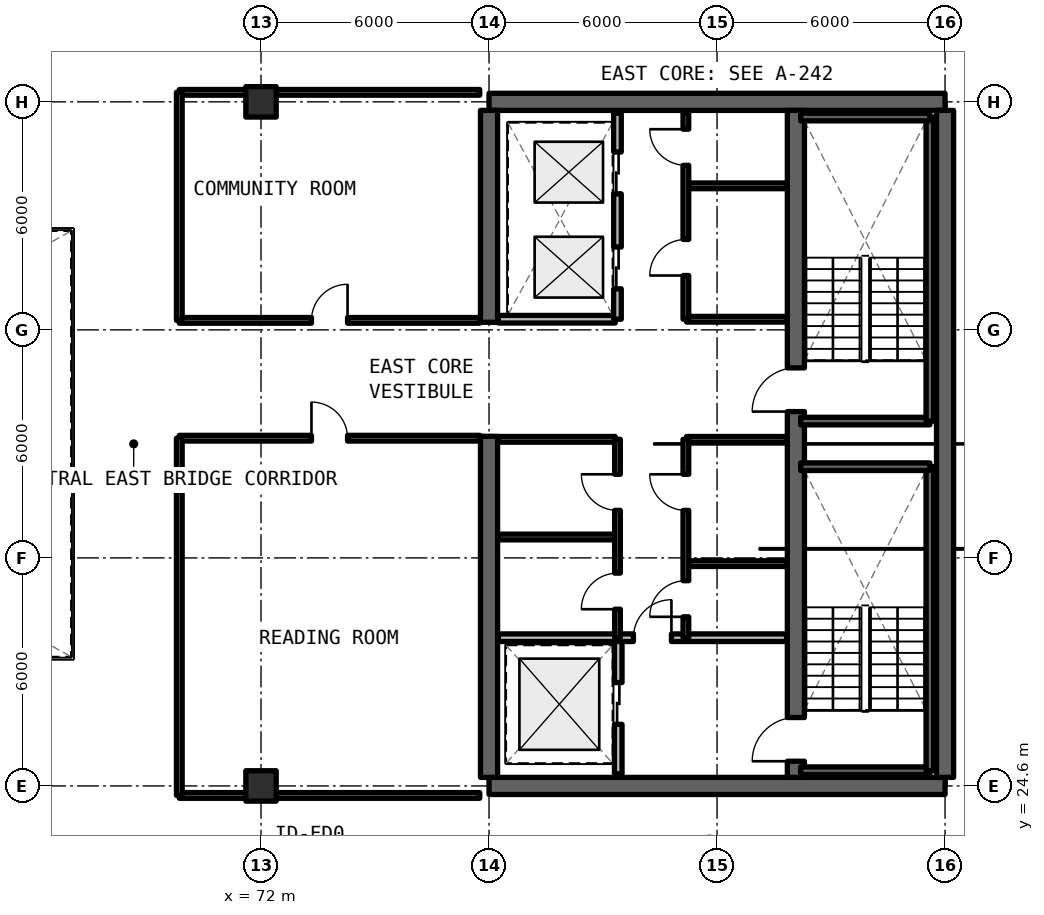
"""IFC4 building model, lengths in metres.
Left out: names, types, materials, properties, quantities, classifications, styles, units other than length and angle.
Written with IfcOpenShell. Run it as: python <this file> out.ifc"""

import sys

from ifc_helpers import new_model, si_unit, direction, frame, frame_2d, origin, origin_2d, place, context, subcontext, project, spatial, rectangle, extrude, element, fill, save


model = new_model("IFC4")
c1 = context("Model", 3, precision=1e-05, world=origin(), true_north=direction((0.0, 1.0)))
c2 = subcontext(c1, "Body", "Model", "MODEL_VIEW")
j1 = project(units=[si_unit("LENGTHUNIT", "METRE"), si_unit("PLANEANGLEUNIT", "RADIAN")], contexts=[c1])
p1 = place(None, origin())
s1 = spatial("IfcSite", under=j1, at=p1, CompositionType="ELEMENT")
p2 = place(p1, origin())
s2 = spatial("IfcBuilding", under=s1, at=p2, CompositionType="ELEMENT")
p3 = place(p2, frame((0.0, 0.0, 188.43)))
s3 = spatial("IfcBuildingStorey", under=s2, at=p3, CompositionType="ELEMENT", Elevation=188.43)
for number, where, z_axis, x_axis in (
    (1, (78.0, 24.6, 0.0), (0.0, 0.0, 1.0), (1.0, 0.0, 0.0)),
    (2, (90.0, 42.6, 0.0), (0.0, 0.0, 1.0), (-1.0, 0.0, 0.0)),
):
    element("IfcWall", number, at=place(p3, frame(where, z_axis=z_axis, x_axis=x_axis)), inside=s3, PredefinedType="SHEAR", context=c2, shape_type="SweptSolid", body=[
        extrude(rectangle(XDim=12.0, YDim=0.45, at=frame_2d((6.0, 0.0))), origin(), (0.0, 0.0, 1.0), 3.3),
    ])
p4 = place(p3, frame((90.0, 24.825, 0.0), z_axis=(0.0, 0.0, 1.0), x_axis=(0.0, 1.0, 0.0)))
e3 = element("IfcWall", 3, at=p4, inside=s3, PredefinedType="SHEAR", context=c2, shape_type="SweptSolid", body=[
    extrude(rectangle(XDim=17.55, YDim=0.45, at=frame_2d((8.775, 0.0))), origin(), (0.0, 0.0, 1.0), 3.3),
])
p5 = place(p3, frame((78.0, 24.825, 0.0), z_axis=(0.0, 0.0, 1.0), x_axis=(0.0, 1.0, 0.0)))
e4 = element("IfcWall", 4, at=p5, inside=s3, PredefinedType="SHEAR", context=c2, shape_type="SweptSolid", body=[
    extrude(rectangle(XDim=8.975, YDim=0.45, at=frame_2d((4.488, 0.0))), origin(), (0.0, 0.0, 1.0), 3.3),
])
p6 = place(p3, frame((78.0, 36.8, 0.0), z_axis=(0.0, 0.0, 1.0), x_axis=(0.0, 1.0, 0.0)))
e5 = element("IfcWall", 5, at=p6, inside=s3, PredefinedType="SHEAR", context=c2, shape_type="SweptSolid", body=[
    extrude(rectangle(XDim=5.575, YDim=0.45, at=frame_2d((2.788, 0.0))), origin(), (0.0, 0.0, 1.0), 3.3),
])
p7 = place(p3, frame((86.075, 24.825, 0.0), z_axis=(0.0, 0.0, 1.0), x_axis=(0.0, 1.0, 0.0)))
e6 = element("IfcWall", 6, at=p7, inside=s3, PredefinedType="SHEAR", context=c2, shape_type="SweptSolid", body=[
    extrude(rectangle(XDim=17.55, YDim=0.45, at=frame_2d((8.775, 0.0))), origin(), (0.0, 0.0, 1.0), 3.3),
])
p8 = place(p7, frame((0.425, 0.0, 0.0)))
e7 = element("IfcOpeningElement", 7, at=p8, cuts=e6, PredefinedType="OPENING", context=c2, shape_type="SweptSolid", body=[
    extrude(rectangle(XDim=1.15, YDim=2.15, at=frame_2d((0.575, 1.075))), frame((0.0, 0.235, 0.0), z_axis=(0.0, -1.0, 0.0), x_axis=(1.0, 0.0, 0.0)), (0.0, 0.0, 1.0), 0.47),
])
p9 = place(p7, frame((9.625, 0.0, 0.0)))
e8 = element("IfcOpeningElement", 8, at=p9, cuts=e6, PredefinedType="OPENING", context=c2, shape_type="SweptSolid", body=[
    extrude(rectangle(XDim=1.15, YDim=2.15, at=frame_2d((0.575, 1.075))), frame((0.0, 0.235, 0.0), z_axis=(0.0, -1.0, 0.0), x_axis=(1.0, 0.0, 0.0)), (0.0, 0.0, 1.0), 0.47),
])
for number, where, z_axis, x_axis in (
    (9, (72.0, 24.6, 0.0), (0.0, 0.0, 1.0), (1.0, 0.0, 0.0)),
    (10, (72.0, 42.6, 0.0), (0.0, 0.0, 1.0), (1.0, 0.0, 0.0)),
):
    element("IfcColumn", number, at=place(p3, frame(where, z_axis=z_axis, x_axis=x_axis)), inside=s3, PredefinedType="COLUMN", context=c2, shape_type="SweptSolid", body=[
        extrude(rectangle(XDim=0.8, YDim=0.8, at=origin_2d()), origin(), (0.0, 0.0, 1.0), 3.3),
    ])
p10 = place(p3, frame((81.4, 24.92, 0.0), z_axis=(0.0, 0.0, 1.0), x_axis=(0.0, 1.0, 0.0)))
e11 = element("IfcWall", 11, at=p10, inside=s3, PredefinedType="SOLIDWALL", context=c2, shape_type="SweptSolid", body=[
    extrude(rectangle(XDim=3.58, YDim=0.2, at=frame_2d((1.79, 0.0))), origin(), (0.0, 0.0, 1.0), 2.35),
])
p11 = place(p10, frame((1.3, 0.0, 0.0)))
e12 = element("IfcOpeningElement", 12, at=p11, cuts=e11, PredefinedType="OPENING", context=c2, shape_type="SweptSolid", body=[
    extrude(rectangle(XDim=1.1, YDim=2.2, at=frame_2d((0.55, 1.1))), frame((0.0, 0.11, 0.0), z_axis=(0.0, -1.0, 0.0), x_axis=(1.0, 0.0, 0.0)), (0.0, 0.0, 1.0), 0.22),
])
p12 = place(p3, frame((78.245, 28.5, 0.0), z_axis=(0.0, 0.0, 1.0), x_axis=(1.0, 0.0, 0.0)))
e13 = element("IfcWall", 13, at=p12, inside=s3, PredefinedType="SOLIDWALL", context=c2, shape_type="SweptSolid", body=[
    extrude(rectangle(XDim=7.585, YDim=0.2, at=frame_2d((3.792, 0.0))), origin(), (0.0, 0.0, 1.0), 2.35),
])
p13 = place(p12, frame((3.555, 0.0, 0.0)))
e14 = element("IfcOpeningElement", 14, at=p13, cuts=e13, PredefinedType="OPENING", context=c2, shape_type="SweptSolid", body=[
    extrude(rectangle(XDim=1.0, YDim=2.15, at=frame_2d((0.5, 1.075))), frame((0.0, 0.11, 0.0), z_axis=(0.0, -1.0, 0.0), x_axis=(1.0, 0.0, 0.0)), (0.0, 0.0, 1.0), 0.22),
])
for number, where, z_axis, x_axis in (
    (15, (83.2, 30.45, 0.0), (0.0, 0.0, 1.0), (1.0, 0.0, 0.0)),
    (16, (83.2, 33.72, 0.0), (0.0, 0.0, 1.0), (1.0, 0.0, 0.0)),
):
    element("IfcWall", number, at=place(p3, frame(where, z_axis=z_axis, x_axis=x_axis)), inside=s3, PredefinedType="SOLIDWALL", context=c2, shape_type="SweptSolid", body=[
        extrude(rectangle(XDim=2.63, YDim=0.15, at=frame_2d((1.315, 0.0))), origin(), (0.0, 0.0, 1.0), 2.35),
    ])
p14 = place(p3, frame((83.18, 28.5, 0.0), z_axis=(0.0, 0.0, 1.0), x_axis=(0.0, 1.0, 0.0)))
e17 = element("IfcWall", 17, at=p14, inside=s3, PredefinedType="SOLIDWALL", context=c2, shape_type="SweptSolid", body=[
    extrude(rectangle(XDim=5.22, YDim=0.15, at=frame_2d((2.61, 0.0))), origin(), (0.0, 0.0, 1.0), 2.35),
])
p15 = place(p14, frame((0.55, 0.0, 0.0)))
e18 = element("IfcOpeningElement", 18, at=p15, cuts=e17, PredefinedType="OPENING", context=c2, shape_type="SweptSolid", body=[
    extrude(rectangle(XDim=0.95, YDim=2.15, at=frame_2d((0.475, 1.075))), frame((0.0, 0.085, 0.0), z_axis=(0.0, -1.0, 0.0), x_axis=(1.0, 0.0, 0.0)), (0.0, 0.0, 1.0), 0.17),
])
p16 = place(p14, frame((3.35, 0.0, 0.0)))
e19 = element("IfcOpeningElement", 19, at=p16, cuts=e17, PredefinedType="OPENING", context=c2, shape_type="SweptSolid", body=[
    extrude(rectangle(XDim=0.95, YDim=2.15, at=frame_2d((0.475, 1.075))), frame((0.0, 0.085, 0.0), z_axis=(0.0, -1.0, 0.0), x_axis=(1.0, 0.0, 0.0)), (0.0, 0.0, 1.0), 0.17),
])
for number, where, z_axis, x_axis in (
    (20, (78.245, 31.15, 0.0), (0.0, 0.0, 1.0), (1.0, 0.0, 0.0)),
    (21, (78.245, 33.72, 0.0), (0.0, 0.0, 1.0), (1.0, 0.0, 0.0)),
):
    element("IfcWall", number, at=place(p3, frame(where, z_axis=z_axis, x_axis=x_axis)), inside=s3, PredefinedType="SOLIDWALL", context=c2, shape_type="SweptSolid", body=[
        extrude(rectangle(XDim=3.075, YDim=0.15, at=frame_2d((1.538, 0.0))), origin(), (0.0, 0.0, 1.0), 2.35),
    ])
p17 = place(p3, frame((81.38, 28.5, 0.0), z_axis=(0.0, 0.0, 1.0), x_axis=(0.0, 1.0, 0.0)))
e22 = element("IfcWall", 22, at=p17, inside=s3, PredefinedType="SOLIDWALL", context=c2, shape_type="SweptSolid", body=[
    extrude(rectangle(XDim=5.22, YDim=0.15, at=frame_2d((2.61, 0.0))), origin(), (0.0, 0.0, 1.0), 2.35),
])
p18 = place(p17, frame((0.75, 0.0, 0.0)))
e23 = element("IfcOpeningElement", 23, at=p18, cuts=e22, PredefinedType="OPENING", context=c2, shape_type="SweptSolid", body=[
    extrude(rectangle(XDim=0.95, YDim=2.15, at=frame_2d((0.475, 1.075))), frame((0.0, 0.085, 0.0), z_axis=(0.0, -1.0, 0.0), x_axis=(1.0, 0.0, 0.0)), (0.0, 0.0, 1.0), 0.17),
])
p19 = place(p17, frame((3.35, 0.0, 0.0)))
e24 = element("IfcOpeningElement", 24, at=p19, cuts=e22, PredefinedType="OPENING", context=c2, shape_type="SweptSolid", body=[
    extrude(rectangle(XDim=0.95, YDim=2.15, at=frame_2d((0.475, 1.075))), frame((0.0, 0.085, 0.0), z_axis=(0.0, -1.0, 0.0), x_axis=(1.0, 0.0, 0.0)), (0.0, 0.0, 1.0), 0.17),
])
for number, where, z_axis, x_axis in (
    (25, (83.2, 36.88, 0.0), (0.0, 0.0, 1.0), (1.0, 0.0, 0.0)),
    (26, (83.2, 40.39, 0.0), (0.0, 0.0, 1.0), (1.0, 0.0, 0.0)),
):
    element("IfcWall", number, at=place(p3, frame(where, z_axis=z_axis, x_axis=x_axis)), inside=s3, PredefinedType="SOLIDWALL", context=c2, shape_type="SweptSolid", body=[
        extrude(rectangle(XDim=2.63, YDim=0.15, at=frame_2d((1.315, 0.0))), origin(), (0.0, 0.0, 1.0), 2.35),
    ])
p20 = place(p3, frame((83.18, 36.88, 0.0), z_axis=(0.0, 0.0, 1.0), x_axis=(0.0, 1.0, 0.0)))
e27 = element("IfcWall", 27, at=p20, inside=s3, PredefinedType="SOLIDWALL", context=c2, shape_type="SweptSolid", body=[
    extrude(rectangle(XDim=5.42, YDim=0.15, at=frame_2d((2.71, 0.0))), origin(), (0.0, 0.0, 1.0), 2.35),
])
p21 = place(p20, frame((1.15, 0.0, 0.0)))
e28 = element("IfcOpeningElement", 28, at=p21, cuts=e27, PredefinedType="OPENING", context=c2, shape_type="SweptSolid", body=[
    extrude(rectangle(XDim=0.95, YDim=2.15, at=frame_2d((0.475, 1.075))), frame((0.0, 0.085, 0.0), z_axis=(0.0, -1.0, 0.0), x_axis=(1.0, 0.0, 0.0)), (0.0, 0.0, 1.0), 0.17),
])
p22 = place(p20, frame((4.05, 0.0, 0.0)))
e29 = element("IfcOpeningElement", 29, at=p22, cuts=e27, PredefinedType="OPENING", context=c2, shape_type="SweptSolid", body=[
    extrude(rectangle(XDim=0.95, YDim=2.15, at=frame_2d((0.475, 1.075))), frame((0.0, 0.085, 0.0), z_axis=(0.0, -1.0, 0.0), x_axis=(1.0, 0.0, 0.0)), (0.0, 0.0, 1.0), 0.17),
])
p23 = place(p3, frame((78.245, 36.88, 0.0), z_axis=(0.0, 0.0, 1.0), x_axis=(1.0, 0.0, 0.0)))
e30 = element("IfcWall", 30, at=p23, inside=s3, PredefinedType="SOLIDWALL", context=c2, shape_type="SweptSolid", body=[
    extrude(rectangle(XDim=3.075, YDim=0.2, at=frame_2d((1.538, 0.0))), origin(), (0.0, 0.0, 1.0), 2.35),
])
p24 = place(p3, frame((81.38, 36.88, 0.0), z_axis=(0.0, 0.0, 1.0), x_axis=(0.0, 1.0, 0.0)))
e31 = element("IfcWall", 31, at=p24, inside=s3, PredefinedType="SOLIDWALL", context=c2, shape_type="SweptSolid", body=[
    extrude(rectangle(XDim=5.42, YDim=0.2, at=frame_2d((2.71, 0.0))), origin(), (0.0, 0.0, 1.0), 2.35),
])
p25 = place(p24, frame((0.8, 0.0, 0.0)))
e32 = element("IfcOpeningElement", 32, at=p25, cuts=e31, PredefinedType="OPENING", context=c2, shape_type="SweptSolid", body=[
    extrude(rectangle(XDim=1.1, YDim=2.2, at=frame_2d((0.55, 1.1))), frame((0.0, 0.11, 0.0), z_axis=(0.0, -1.0, 0.0), x_axis=(1.0, 0.0, 0.0)), (0.0, 0.0, 1.0), 0.22),
])
p26 = place(p24, frame((3.3, 0.0, 0.0)))
e33 = element("IfcOpeningElement", 33, at=p26, cuts=e31, PredefinedType="OPENING", context=c2, shape_type="SweptSolid", body=[
    extrude(rectangle(XDim=1.1, YDim=2.2, at=frame_2d((0.55, 1.1))), frame((0.0, 0.11, 0.0), z_axis=(0.0, -1.0, 0.0), x_axis=(1.0, 0.0, 0.0)), (0.0, 0.0, 1.0), 0.22),
])
p27 = place(p3, frame((69.85, 24.35, 0.0), z_axis=(0.0, 0.0, 1.0), x_axis=(1.0, 0.0, 0.0)))
e34 = element("IfcWall", 34, at=p27, inside=s3, PredefinedType="SOLIDWALL", context=c2, shape_type="SweptSolid", body=[
    extrude(rectangle(XDim=7.905, YDim=0.15, at=frame_2d((3.952, 0.0))), origin(), (0.0, 0.0, 1.0), 2.35),
])
p28 = place(p3, frame((69.85, 33.75, 0.0), z_axis=(0.0, 0.0, 1.0), x_axis=(1.0, 0.0, 0.0)))
e35 = element("IfcWall", 35, at=p28, inside=s3, PredefinedType="SOLIDWALL", context=c2, shape_type="SweptSolid", body=[
    extrude(rectangle(XDim=7.905, YDim=0.15, at=frame_2d((3.952, 0.0))), origin(), (0.0, 0.0, 1.0), 2.35),
])
p29 = place(p28, frame((3.478, 0.0, 0.0)))
e36 = element("IfcOpeningElement", 36, at=p29, cuts=e35, PredefinedType="OPENING", context=c2, shape_type="SweptSolid", body=[
    extrude(rectangle(XDim=0.95, YDim=2.15, at=frame_2d((0.475, 1.075))), frame((0.0, 0.085, 0.0), z_axis=(0.0, -1.0, 0.0), x_axis=(1.0, 0.0, 0.0)), (0.0, 0.0, 1.0), 0.17),
])
p30 = place(p3, frame((69.85, 24.35, 0.0), z_axis=(0.0, 0.0, 1.0), x_axis=(0.0, 1.0, 0.0)))
e37 = element("IfcWall", 37, at=p30, inside=s3, PredefinedType="SOLIDWALL", context=c2, shape_type="SweptSolid", body=[
    extrude(rectangle(XDim=9.4, YDim=0.15, at=frame_2d((4.7, 0.0))), origin(), (0.0, 0.0, 1.0), 2.35),
])
p31 = place(p3, frame((69.85, 36.85, 0.0), z_axis=(0.0, 0.0, 1.0), x_axis=(1.0, 0.0, 0.0)))
e38 = element("IfcWall", 38, at=p31, inside=s3, PredefinedType="SOLIDWALL", context=c2, shape_type="SweptSolid", body=[
    extrude(rectangle(XDim=7.905, YDim=0.15, at=frame_2d((3.952, 0.0))), origin(), (0.0, 0.0, 1.0), 2.35),
])
p32 = place(p31, frame((3.478, 0.0, 0.0)))
e39 = element("IfcOpeningElement", 39, at=p32, cuts=e38, PredefinedType="OPENING", context=c2, shape_type="SweptSolid", body=[
    extrude(rectangle(XDim=0.95, YDim=2.15, at=frame_2d((0.475, 1.075))), frame((0.0, 0.085, 0.0), z_axis=(0.0, -1.0, 0.0), x_axis=(1.0, 0.0, 0.0)), (0.0, 0.0, 1.0), 0.17),
])
p33 = place(p3, frame((69.85, 42.85, 0.0), z_axis=(0.0, 0.0, 1.0), x_axis=(1.0, 0.0, 0.0)))
e40 = element("IfcWall", 40, at=p33, inside=s3, PredefinedType="SOLIDWALL", context=c2, shape_type="SweptSolid", body=[
    extrude(rectangle(XDim=7.905, YDim=0.15, at=frame_2d((3.952, 0.0))), origin(), (0.0, 0.0, 1.0), 2.35),
])
p34 = place(p3, frame((69.85, 36.85, 0.0), z_axis=(0.0, 0.0, 1.0), x_axis=(0.0, 1.0, 0.0)))
e41 = element("IfcWall", 41, at=p34, inside=s3, PredefinedType="SOLIDWALL", context=c2, shape_type="SweptSolid", body=[
    extrude(rectangle(XDim=6.0, YDim=0.15, at=frame_2d((3.0, 0.0))), origin(), (0.0, 0.0, 1.0), 2.35),
])
p35 = place(p3, frame((86.2, 25.0, 0.0), z_axis=(0.0, 0.0, 1.0), x_axis=(1.0, 0.0, 0.0)))
e42 = element("IfcWall", 42, at=p35, inside=s3, PredefinedType="SOLIDWALL", context=c2, shape_type="SweptSolid", body=[
    extrude(rectangle(XDim=3.4, YDim=0.2, at=frame_2d((1.7, 0.0))), origin(), (0.0, 0.0, 1.0), 3.3),
])
p36 = place(p3, frame((89.6, 25.0, 0.0), z_axis=(0.0, 0.0, 1.0), x_axis=(0.0, 1.0, 0.0)))
e43 = element("IfcWall", 43, at=p36, inside=s3, PredefinedType="SOLIDWALL", context=c2, shape_type="SweptSolid", body=[
    extrude(rectangle(XDim=8.0, YDim=0.2, at=frame_2d((4.0, 0.0))), origin(), (0.0, 0.0, 1.0), 3.3),
])
for number, where, z_axis, x_axis in (
    (44, (89.6, 33.0, 0.0), (0.0, 0.0, 1.0), (-1.0, 0.0, 0.0)),
    (45, (86.2, 34.2, 0.0), (0.0, 0.0, 1.0), (1.0, 0.0, 0.0)),
):
    element("IfcWall", number, at=place(p3, frame(where, z_axis=z_axis, x_axis=x_axis)), inside=s3, PredefinedType="SOLIDWALL", context=c2, shape_type="SweptSolid", body=[
        extrude(rectangle(XDim=3.4, YDim=0.2, at=frame_2d((1.7, 0.0))), origin(), (0.0, 0.0, 1.0), 3.3),
    ])
p37 = place(p3, frame((89.6, 34.2, 0.0), z_axis=(0.0, 0.0, 1.0), x_axis=(0.0, 1.0, 0.0)))
e46 = element("IfcWall", 46, at=p37, inside=s3, PredefinedType="SOLIDWALL", context=c2, shape_type="SweptSolid", body=[
    extrude(rectangle(XDim=8.0, YDim=0.2, at=frame_2d((4.0, 0.0))), origin(), (0.0, 0.0, 1.0), 3.3),
])
p38 = place(p3, frame((89.6, 42.2, 0.0), z_axis=(0.0, 0.0, 1.0), x_axis=(-1.0, 0.0, 0.0)))
e47 = element("IfcWall", 47, at=p38, inside=s3, PredefinedType="SOLIDWALL", context=c2, shape_type="SweptSolid", body=[
    extrude(rectangle(XDim=3.4, YDim=0.2, at=frame_2d((1.7, 0.0))), origin(), (0.0, 0.0, 1.0), 3.3),
])
p39 = place(p11, origin())
e48 = element("IfcDoor", 48, at=p39, inside=s3, OperationType="SLIDING_TO_LEFT", PredefinedType="DOOR", context=c2, shape_type="SweptSolid", body=[
    extrude(rectangle(XDim=1.1, YDim=2.2, at=frame_2d((0.55, 1.1))), frame((0.0, 0.025, 0.0), z_axis=(0.0, -1.0, 0.0), x_axis=(1.0, 0.0, 0.0)), (0.0, 0.0, 1.0), 0.05),
])
fill(e12, e48)
p40 = place(p13, origin())
e49 = element("IfcDoor", 49, at=p40, inside=s3, OperationType="SINGLE_SWING_RIGHT", PredefinedType="DOOR", context=c2, shape_type="SweptSolid", body=[
    extrude(rectangle(XDim=1.0, YDim=2.15, at=frame_2d((0.5, 1.075))), frame((0.0, 0.025, 0.0), z_axis=(0.0, -1.0, 0.0), x_axis=(1.0, 0.0, 0.0)), (0.0, 0.0, 1.0), 0.05),
])
fill(e14, e49)
p41 = place(p15, origin())
e50 = element("IfcDoor", 50, at=p41, inside=s3, OperationType="SINGLE_SWING_LEFT", PredefinedType="DOOR", context=c2, shape_type="SweptSolid", body=[
    extrude(rectangle(XDim=0.95, YDim=2.15, at=frame_2d((0.475, 1.075))), frame((0.0, 0.025, 0.0), z_axis=(0.0, -1.0, 0.0), x_axis=(1.0, 0.0, 0.0)), (0.0, 0.0, 1.0), 0.05),
])
fill(e18, e50)
p42 = place(p16, origin())
e51 = element("IfcDoor", 51, at=p42, inside=s3, OperationType="SINGLE_SWING_RIGHT", PredefinedType="DOOR", context=c2, shape_type="SweptSolid", body=[
    extrude(rectangle(XDim=0.95, YDim=2.15, at=frame_2d((0.475, 1.075))), frame((0.0, 0.025, 0.0), z_axis=(0.0, -1.0, 0.0), x_axis=(1.0, 0.0, 0.0)), (0.0, 0.0, 1.0), 0.05),
])
fill(e19, e51)
p43 = place(p18, origin())
e52 = element("IfcDoor", 52, at=p43, inside=s3, OperationType="SINGLE_SWING_LEFT", PredefinedType="DOOR", context=c2, shape_type="SweptSolid", body=[
    extrude(rectangle(XDim=0.95, YDim=2.15, at=frame_2d((0.475, 1.075))), frame((0.0, 0.025, 0.0), z_axis=(0.0, -1.0, 0.0), x_axis=(1.0, 0.0, 0.0)), (0.0, 0.0, 1.0), 0.05),
])
fill(e23, e52)
p44 = place(p19, origin())
e53 = element("IfcDoor", 53, at=p44, inside=s3, OperationType="SINGLE_SWING_RIGHT", PredefinedType="DOOR", context=c2, shape_type="SweptSolid", body=[
    extrude(rectangle(XDim=0.95, YDim=2.15, at=frame_2d((0.475, 1.075))), frame((0.0, 0.025, 0.0), z_axis=(0.0, -1.0, 0.0), x_axis=(1.0, 0.0, 0.0)), (0.0, 0.0, 1.0), 0.05),
])
fill(e24, e53)
p45 = place(p21, origin())
e54 = element("IfcDoor", 54, at=p45, inside=s3, OperationType="SINGLE_SWING_LEFT", PredefinedType="DOOR", context=c2, shape_type="SweptSolid", body=[
    extrude(rectangle(XDim=0.95, YDim=2.15, at=frame_2d((0.475, 1.075))), frame((0.0, 0.025, 0.0), z_axis=(0.0, -1.0, 0.0), x_axis=(1.0, 0.0, 0.0)), (0.0, 0.0, 1.0), 0.05),
])
fill(e28, e54)
p46 = place(p22, origin())
e55 = element("IfcDoor", 55, at=p46, inside=s3, OperationType="SINGLE_SWING_RIGHT", PredefinedType="DOOR", context=c2, shape_type="SweptSolid", body=[
    extrude(rectangle(XDim=0.95, YDim=2.15, at=frame_2d((0.475, 1.075))), frame((0.0, 0.025, 0.0), z_axis=(0.0, -1.0, 0.0), x_axis=(1.0, 0.0, 0.0)), (0.0, 0.0, 1.0), 0.05),
])
fill(e29, e55)
p47 = place(p25, origin())
e56 = element("IfcDoor", 56, at=p47, inside=s3, OperationType="SLIDING_TO_LEFT", PredefinedType="DOOR", context=c2, shape_type="SweptSolid", body=[
    extrude(rectangle(XDim=1.1, YDim=2.2, at=frame_2d((0.55, 1.1))), frame((0.0, 0.025, 0.0), z_axis=(0.0, -1.0, 0.0), x_axis=(1.0, 0.0, 0.0)), (0.0, 0.0, 1.0), 0.05),
])
fill(e32, e56)
p48 = place(p26, origin())
e57 = element("IfcDoor", 57, at=p48, inside=s3, OperationType="SLIDING_TO_RIGHT", PredefinedType="DOOR", context=c2, shape_type="SweptSolid", body=[
    extrude(rectangle(XDim=1.1, YDim=2.2, at=frame_2d((0.55, 1.1))), frame((0.0, 0.025, 0.0), z_axis=(0.0, -1.0, 0.0), x_axis=(1.0, 0.0, 0.0)), (0.0, 0.0, 1.0), 0.05),
])
fill(e33, e57)
p49 = place(p29, origin())
e58 = element("IfcDoor", 58, at=p49, inside=s3, OperationType="SINGLE_SWING_LEFT", PredefinedType="DOOR", context=c2, shape_type="SweptSolid", body=[
    extrude(rectangle(XDim=0.95, YDim=2.15, at=frame_2d((0.475, 1.075))), frame((0.0, 0.025, 0.0), z_axis=(0.0, -1.0, 0.0), x_axis=(1.0, 0.0, 0.0)), (0.0, 0.0, 1.0), 0.05),
])
fill(e36, e58)
p50 = place(p32, origin())
e59 = element("IfcDoor", 59, at=p50, inside=s3, OperationType="SINGLE_SWING_RIGHT", PredefinedType="DOOR", context=c2, shape_type="SweptSolid", body=[
    extrude(rectangle(XDim=0.95, YDim=2.15, at=frame_2d((0.475, 1.075))), frame((0.0, 0.025, 0.0), z_axis=(0.0, -1.0, 0.0), x_axis=(1.0, 0.0, 0.0)), (0.0, 0.0, 1.0), 0.05),
])
fill(e39, e59)
p51 = place(p8, origin())
e60 = element("IfcDoor", 60, at=p51, inside=s3, OperationType="SINGLE_SWING_RIGHT", PredefinedType="DOOR", context=c2, shape_type="SweptSolid", body=[
    extrude(rectangle(XDim=1.15, YDim=2.15, at=frame_2d((0.575, 1.075))), frame((0.0, 0.025, 0.0), z_axis=(0.0, -1.0, 0.0), x_axis=(1.0, 0.0, 0.0)), (0.0, 0.0, 1.0), 0.05),
])
fill(e7, e60)
p52 = place(p9, origin())
e61 = element("IfcDoor", 61, at=p52, inside=s3, OperationType="SINGLE_SWING_LEFT", PredefinedType="DOOR", context=c2, shape_type="SweptSolid", body=[
    extrude(rectangle(XDim=1.15, YDim=2.15, at=frame_2d((0.575, 1.075))), frame((0.0, 0.025, 0.0), z_axis=(0.0, -1.0, 0.0), x_axis=(1.0, 0.0, 0.0)), (0.0, 0.0, 1.0), 0.05),
])
fill(e8, e61)
save(model, sys.argv[1])
